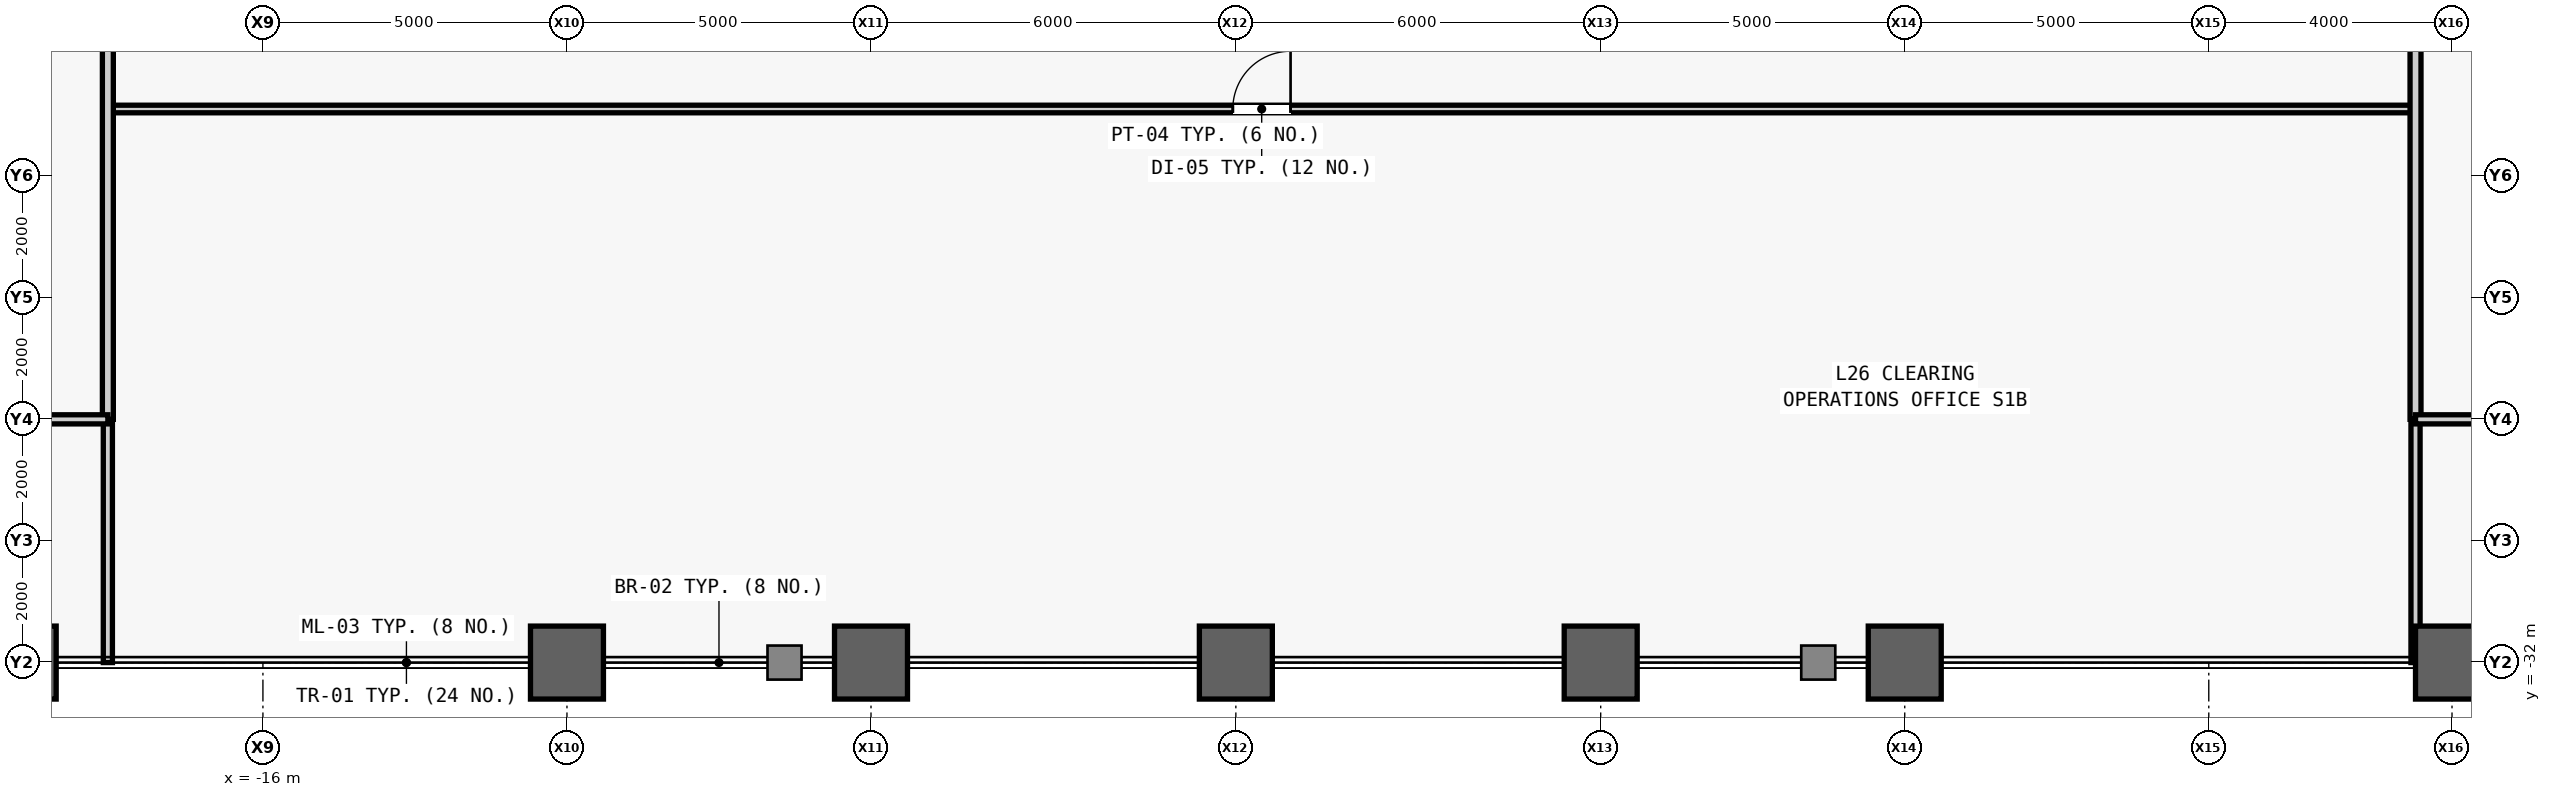
"""IFC4 building model, lengths in metres.
Left out: names, types, materials, properties, quantities, classifications, styles, units other than length and angle.
Written with IfcOpenShell. Run it as: python <this file> out.ifc"""

import sys

from ifc_helpers import new_model, si_unit, direction, frame, frame_2d, origin, origin_2d, place, context, subcontext, project, spatial, rectangle, hollow_rectangle, extrude, source, transform, mapped, element, fill, save


model = new_model("IFC4")
c1 = context("Model", 3, precision=1e-05, world=origin(), true_north=direction((0.0, 1.0)))
c2 = subcontext(c1, "Body", "Model", "MODEL_VIEW")
j1 = project(units=[si_unit("LENGTHUNIT", "METRE"), si_unit("PLANEANGLEUNIT", "RADIAN")], contexts=[c1])
p1 = place(None, origin())
s1 = spatial("IfcSite", under=j1, at=p1, CompositionType="ELEMENT")
p2 = place(p1, origin())
s2 = spatial("IfcBuilding", under=s1, at=p2, CompositionType="ELEMENT")
p3 = place(p2, frame((0.0, 0.0, 116.0)))
s3 = spatial("IfcBuildingStorey", under=s2, at=p3, CompositionType="ELEMENT", Elevation=116.0)
m1 = source(origin(), c2, "Body", "SweptSolid", [
    extrude(hollow_rectangle(XDim=1.2, YDim=1.2, WallThickness=0.07, at=origin_2d()), origin(), (0.0, 0.0, 1.0), 4.1),
])
for number, where, z_axis, x_axis in (
    (1, (-20.0, -32.0, 0.0), (0.0, 0.0, 1.0), (1.0, 0.0, 0.0)),
    (2, (-11.0, -32.0, 0.0), (0.0, 0.0, 1.0), (1.0, 0.0, 0.0)),
    (3, (-6.0, -32.0, 0.0), (0.0, 0.0, 1.0), (1.0, 0.0, 0.0)),
    (4, (0.0, -32.0, 0.0), (0.0, 0.0, 1.0), (1.0, 0.0, 0.0)),
    (5, (6.0, -32.0, 0.0), (0.0, 0.0, 1.0), (1.0, 0.0, 0.0)),
    (6, (11.0, -32.0, 0.0), (0.0, 0.0, 1.0), (1.0, 0.0, 0.0)),
    (7, (20.0, -32.0, 0.0), (0.0, 0.0, 1.0), (1.0, 0.0, 0.0)),
):
    element("IfcColumn", number, at=place(p3, frame(where, z_axis=z_axis, x_axis=x_axis)), inside=s3, PredefinedType="COLUMN", context=c2, shape_type="MappedRepresentation", body=[
        mapped(m1, transform((0.0, 0.0, 0.0), scale=1.0)),
    ])
m2 = source(origin(), c2, "Body", "SweptSolid", [
    extrude(rectangle(XDim=37.95, YDim=0.125, at=frame_2d((18.975, 0.0))), origin(), (0.0, 0.0, 1.0), 3.84),
])
p4 = place(p3, frame((-18.55, -22.896, 0.0), z_axis=(0.0, 0.0, 1.0), x_axis=(1.0, 0.0, 0.0)))
e8 = element("IfcWall", 8, at=p4, inside=s3, PredefinedType="PARTITIONING", context=c2, shape_type="MappedRepresentation", body=[
    mapped(m2, transform((0.0, 0.0, 0.0), scale=1.0)),
])
m3 = source(origin(), c2, "Body", "SweptSolid", [
    extrude(rectangle(XDim=0.95, YDim=2.15, at=frame_2d((0.475, 1.075))), frame((0.0, 0.073, 0.0), z_axis=(0.0, -1.0, 0.0), x_axis=(1.0, 0.0, 0.0)), (0.0, 0.0, 1.0), 0.145),
])
p5 = place(p4, frame((18.5, 0.0, 0.0)))
e9 = element("IfcOpeningElement", 9, at=p5, cuts=e8, PredefinedType="OPENING", context=c2, shape_type="MappedRepresentation", body=[
    mapped(m3, transform((0.0, 0.0, 0.0), scale=1.0)),
])
m4 = source(origin(), c2, "Body", "SweptSolid", [
    extrude(rectangle(XDim=4.0, YDim=0.15, at=frame_2d((2.0, 0.0))), origin(), (0.0, 0.0, 1.0), 3.84),
])
for number, where, z_axis, x_axis in (
    (10, (-18.55, -32.0, 0.0), (0.0, 0.0, 1.0), (0.0, 1.0, 0.0)),
    (11, (19.4, -32.0, 0.0), (0.0, 0.0, 1.0), (0.0, 1.0, 0.0)),
):
    element("IfcWall", number, at=place(p3, frame(where, z_axis=z_axis, x_axis=x_axis)), inside=s3, PredefinedType="PARTITIONING", context=c2, shape_type="MappedRepresentation", body=[
        mapped(m4, transform((0.0, 0.0, 0.0), scale=1.0)),
    ])
m5 = source(origin(), c2, "Body", "SweptSolid", [
    extrude(rectangle(XDim=56.0, YDim=0.18, at=frame_2d((28.0, 0.0))), origin(), (0.0, 0.0, 1.0), 3.84),
])
p6 = place(p3, frame((-18.55, -28.0, 0.0), z_axis=(0.0, 0.0, 1.0), x_axis=(0.0, 1.0, 0.0)))
e12 = element("IfcWall", 12, at=p6, inside=s3, PredefinedType="PARTITIONING", context=c2, shape_type="MappedRepresentation", body=[
    mapped(m5, transform((0.0, 0.0, 0.0), scale=1.0)),
])
m6 = source(origin(), c2, "Body", "SweptSolid", [
    extrude(rectangle(XDim=0.95, YDim=2.15, at=frame_2d((0.475, 1.075))), frame((0.0, 0.1, 0.0), z_axis=(0.0, -1.0, 0.0), x_axis=(1.0, 0.0, 0.0)), (0.0, 0.0, 1.0), 0.2),
])
p7 = place(p6, frame((18.002, 0.0, 0.0)))
e13 = element("IfcOpeningElement", 13, at=p7, cuts=e12, PredefinedType="OPENING", context=c2, shape_type="MappedRepresentation", body=[
    mapped(m6, transform((0.0, 0.0, 0.0), scale=1.0)),
])
p8 = place(p6, frame((26.935, 0.0, 0.0)))
e14 = element("IfcOpeningElement", 14, at=p8, cuts=e12, PredefinedType="OPENING", context=c2, shape_type="MappedRepresentation", body=[
    mapped(m6, transform((0.0, 0.0, 0.0), scale=1.0)),
])
p9 = place(p6, frame((36.732, 0.0, 0.0)))
e15 = element("IfcOpeningElement", 15, at=p9, cuts=e12, PredefinedType="OPENING", context=c2, shape_type="MappedRepresentation", body=[
    mapped(m6, transform((0.0, 0.0, 0.0), scale=1.0)),
])
m7 = source(origin(), c2, "Body", "SweptSolid", [
    extrude(rectangle(XDim=56.0, YDim=0.18, at=frame_2d((28.0, 0.0))), origin(), (0.0, 0.0, 1.0), 3.371),
])
p10 = place(p3, frame((19.4, -28.0, 0.0), z_axis=(0.0, 0.0, 1.0), x_axis=(0.0, 1.0, 0.0)))
e16 = element("IfcWall", 16, at=p10, inside=s3, PredefinedType="PARTITIONING", context=c2, shape_type="MappedRepresentation", body=[
    mapped(m7, transform((0.0, 0.0, 0.0), scale=1.0)),
])
p11 = place(p10, frame((20.311, 0.0, 0.0)))
e17 = element("IfcOpeningElement", 17, at=p11, cuts=e16, PredefinedType="OPENING", context=c2, shape_type="MappedRepresentation", body=[
    mapped(m6, transform((0.0, 0.0, 0.0), scale=1.0)),
])
p12 = place(p10, frame((34.135, 0.0, 0.0)))
e18 = element("IfcOpeningElement", 18, at=p12, cuts=e16, PredefinedType="OPENING", context=c2, shape_type="MappedRepresentation", body=[
    mapped(m6, transform((0.0, 0.0, 0.0), scale=1.0)),
])
m8 = source(origin(), c2, "Body", "SweptSolid", [
    extrude(rectangle(XDim=9.45, YDim=0.15, at=frame_2d((4.725, 0.0))), origin(), (0.0, 0.0, 1.0), 3.84),
])
p13 = place(p3, frame((-28.0, -28.0, 0.0), z_axis=(0.0, 0.0, 1.0), x_axis=(1.0, 0.0, 0.0)))
e19 = element("IfcWall", 19, at=p13, inside=s3, PredefinedType="PARTITIONING", context=c2, shape_type="MappedRepresentation", body=[
    mapped(m8, transform((0.0, 0.0, 0.0), scale=1.0)),
])
m9 = source(origin(), c2, "Body", "SweptSolid", [
    extrude(rectangle(XDim=0.95, YDim=2.15, at=frame_2d((0.475, 1.075))), frame((0.0, 0.085, 0.0), z_axis=(0.0, -1.0, 0.0), x_axis=(1.0, 0.0, 0.0)), (0.0, 0.0, 1.0), 0.17),
])
p14 = place(p13, frame((4.25, 0.0, 0.0)))
e20 = element("IfcOpeningElement", 20, at=p14, cuts=e19, PredefinedType="OPENING", context=c2, shape_type="MappedRepresentation", body=[
    mapped(m9, transform((0.0, 0.0, 0.0), scale=1.0)),
])
m10 = source(origin(), c2, "Body", "SweptSolid", [
    extrude(rectangle(XDim=8.6, YDim=0.15, at=frame_2d((4.3, 0.0))), origin(), (0.0, 0.0, 1.0), 3.84),
])
p15 = place(p3, frame((19.4, -28.0, 0.0), z_axis=(0.0, 0.0, 1.0), x_axis=(1.0, 0.0, 0.0)))
e21 = element("IfcWall", 21, at=p15, inside=s3, PredefinedType="PARTITIONING", context=c2, shape_type="MappedRepresentation", body=[
    mapped(m10, transform((0.0, 0.0, 0.0), scale=1.0)),
])
p16 = place(p15, frame((3.825, 0.0, 0.0)))
e22 = element("IfcOpeningElement", 22, at=p16, cuts=e21, PredefinedType="OPENING", context=c2, shape_type="MappedRepresentation", body=[
    mapped(m9, transform((0.0, 0.0, 0.0), scale=1.0)),
])
m11 = source(origin(), c2, "Body", "SweptSolid", [
    extrude(rectangle(XDim=0.95, YDim=2.15, at=frame_2d((0.475, 1.075))), frame((0.0, 0.025, 0.0), z_axis=(0.0, -1.0, 0.0), x_axis=(1.0, 0.0, 0.0)), (0.0, 0.0, 1.0), 0.05),
])
p17 = place(p5, origin())
e23 = element("IfcDoor", 23, at=p17, inside=s3, OperationType="SINGLE_SWING_RIGHT", PredefinedType="DOOR", context=c2, shape_type="MappedRepresentation", body=[
    mapped(m11, transform((0.0, 0.0, 0.0), scale=1.0)),
])
fill(e9, e23)
save(model, sys.argv[1])
